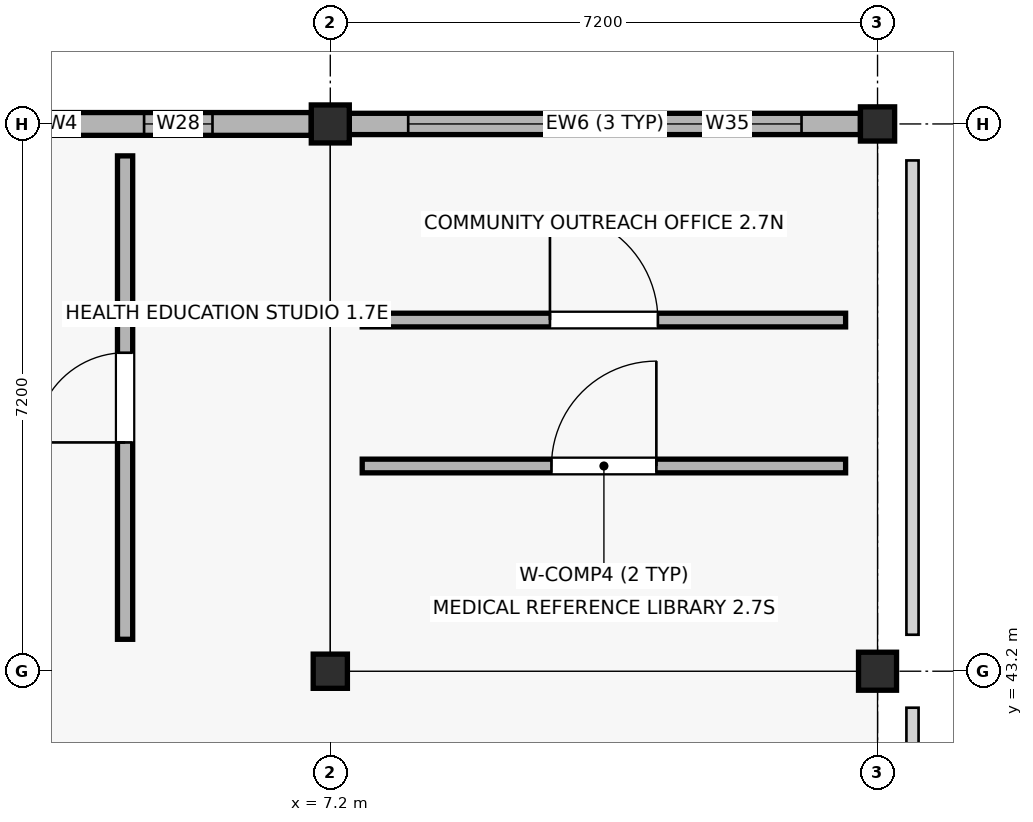
"""IFC4 building model, lengths in metres.
Left out: names, types, materials, properties, quantities, classifications, styles, units other than length and angle.
Written with IfcOpenShell. Run it as: python <this file> out.ifc"""

import sys

from ifc_helpers import new_model, si_unit, direction, frame, frame_2d, origin, origin_2d, place, context, subcontext, project, spatial, rectangle, extrude, element, fill, save


model = new_model("IFC4")
c1 = context("Model", 3, precision=1e-05, world=origin(), true_north=direction((0.0, 1.0)))
c2 = subcontext(c1, "Body", "Model", "MODEL_VIEW")
j1 = project(units=[si_unit("LENGTHUNIT", "METRE"), si_unit("PLANEANGLEUNIT", "RADIAN")], contexts=[c1])
p1 = place(None, origin())
s1 = spatial("IfcSite", under=j1, at=p1, CompositionType="ELEMENT")
p2 = place(p1, origin())
s2 = spatial("IfcBuilding", under=s1, at=p2, CompositionType="ELEMENT")
p3 = place(p2, frame((0.0, 0.0, 13.5)))
s3 = spatial("IfcBuildingStorey", under=s2, at=p3, CompositionType="ELEMENT", Elevation=13.5)
p4 = place(p3, frame((7.2, 43.2, 0.0), z_axis=(0.0, 0.0, 1.0), x_axis=(1.0, 0.0, 0.0)))
e1 = element("IfcColumn", 1, at=p4, inside=s3, PredefinedType="COLUMN", context=c2, shape_type="SweptSolid", body=[
    extrude(rectangle(XDim=0.45, YDim=0.45, at=origin_2d()), origin(), (0.0, 0.0, 1.0), 3.83),
])
for number, where, z_axis, x_axis in (
    (2, (7.2, 50.4, 0.0), (0.0, 0.0, 1.0), (1.0, 0.0, 0.0)),
    (3, (14.4, 43.2, 0.0), (0.0, 0.0, 1.0), (1.0, 0.0, 0.0)),
):
    element("IfcColumn", number, at=place(p3, frame(where, z_axis=z_axis, x_axis=x_axis)), inside=s3, PredefinedType="COLUMN", context=c2, shape_type="SweptSolid", body=[
        extrude(rectangle(XDim=0.5, YDim=0.5, at=origin_2d()), origin(), (0.0, 0.0, 1.0), 3.83),
    ])
p5 = place(p3, frame((14.4, 50.4, 0.0), z_axis=(0.0, 0.0, 1.0), x_axis=(1.0, 0.0, 0.0)))
e4 = element("IfcColumn", 4, at=p5, inside=s3, PredefinedType="COLUMN", context=c2, shape_type="SweptSolid", body=[
    extrude(rectangle(XDim=0.45, YDim=0.45, at=origin_2d()), origin(), (0.0, 0.0, 1.0), 3.83),
])
p6 = place(p3, frame((6.95, 50.4, 0.0), z_axis=(0.0, 0.0, 1.0), x_axis=(-1.0, 0.0, 0.0)))
e5 = element("IfcWall", 5, at=p6, inside=s3, PredefinedType="STANDARD", context=c2, shape_type="SweptSolid", body=[
    extrude(rectangle(XDim=6.725, YDim=0.3, at=frame_2d((3.362, 0.0))), origin(), (0.0, 0.0, 1.0), 3.14),
])
p7 = place(p6, frame((1.3, 0.0, 0.9)))
e6 = element("IfcOpeningElement", 6, at=p7, cuts=e5, PredefinedType="OPENING", context=c2, shape_type="SweptSolid", body=[
    extrude(rectangle(XDim=0.9, YDim=1.62, at=frame_2d((0.45, 0.81))), frame((0.0, 0.16, 0.0), z_axis=(0.0, -1.0, 0.0), x_axis=(1.0, 0.0, 0.0)), (0.0, 0.0, 1.0), 0.32),
])
p8 = place(p6, frame((4.525, 0.0, 0.9)))
e7 = element("IfcOpeningElement", 7, at=p8, cuts=e5, PredefinedType="OPENING", context=c2, shape_type="SweptSolid", body=[
    extrude(rectangle(XDim=0.9, YDim=1.62, at=frame_2d((0.45, 0.81))), frame((0.0, 0.16, 0.0), z_axis=(0.0, -1.0, 0.0), x_axis=(1.0, 0.0, 0.0)), (0.0, 0.0, 1.0), 0.32),
])
p9 = place(p3, frame((14.175, 50.4, 0.0), z_axis=(0.0, 0.0, 1.0), x_axis=(-1.0, 0.0, 0.0)))
e8 = element("IfcWall", 8, at=p9, inside=s3, PredefinedType="STANDARD", context=c2, shape_type="SweptSolid", body=[
    extrude(rectangle(XDim=6.725, YDim=0.28, at=frame_2d((3.363, 0.0))), origin(), (0.0, 0.0, 1.0), 3.14),
])
p10 = place(p9, frame((0.775, 0.0, 0.9)))
e9 = element("IfcOpeningElement", 9, at=p10, cuts=e8, PredefinedType="OPENING", context=c2, shape_type="SweptSolid", body=[
    extrude(rectangle(XDim=1.95, YDim=1.62, at=frame_2d((0.975, 0.81))), frame((0.0, 0.15, 0.0), z_axis=(0.0, -1.0, 0.0), x_axis=(1.0, 0.0, 0.0)), (0.0, 0.0, 1.0), 0.3),
])
p11 = place(p9, frame((4.0, 0.0, 0.9)))
e10 = element("IfcOpeningElement", 10, at=p11, cuts=e8, PredefinedType="OPENING", context=c2, shape_type="SweptSolid", body=[
    extrude(rectangle(XDim=1.95, YDim=1.62, at=frame_2d((0.975, 0.81))), frame((0.0, 0.15, 0.0), z_axis=(0.0, -1.0, 0.0), x_axis=(1.0, 0.0, 0.0)), (0.0, 0.0, 1.0), 0.3),
])
p12 = place(p3, frame((4.5, 43.62, 0.0), z_axis=(0.0, 0.0, 1.0), x_axis=(0.0, 1.0, 0.0)))
e11 = element("IfcWall", 11, at=p12, inside=s3, PredefinedType="SOLIDWALL", context=c2, shape_type="SweptSolid", body=[
    extrude(rectangle(XDim=6.36, YDim=0.2, at=frame_2d((3.18, 0.0))), origin(), (0.0, 0.0, 1.0), 2.93),
])
p13 = place(p12, frame((2.59, 0.0, 0.0)))
e12 = element("IfcOpeningElement", 12, at=p13, cuts=e11, PredefinedType="OPENING", context=c2, shape_type="SweptSolid", body=[
    extrude(rectangle(XDim=1.18, YDim=2.14, at=frame_2d((0.59, 1.07))), frame((0.0, 0.11, 0.0), z_axis=(0.0, -1.0, 0.0), x_axis=(1.0, 0.0, 0.0)), (0.0, 0.0, 1.0), 0.22),
])
p14 = place(p3, frame((7.62, 45.9, 0.0), z_axis=(0.0, 0.0, 1.0), x_axis=(1.0, 0.0, 0.0)))
e13 = element("IfcWall", 13, at=p14, inside=s3, PredefinedType="PARTITIONING", context=c2, shape_type="SweptSolid", body=[
    extrude(rectangle(XDim=6.36, YDim=0.18, at=frame_2d((3.18, 0.0))), origin(), (0.0, 0.0, 1.0), 2.93),
])
p15 = place(p14, frame((2.49, 0.0, 0.0)))
e14 = element("IfcOpeningElement", 14, at=p15, cuts=e13, PredefinedType="OPENING", context=c2, shape_type="SweptSolid", body=[
    extrude(rectangle(XDim=1.38, YDim=2.14, at=frame_2d((0.69, 1.07))), frame((0.0, 0.1, 0.0), z_axis=(0.0, -1.0, 0.0), x_axis=(1.0, 0.0, 0.0)), (0.0, 0.0, 1.0), 0.2),
])
p16 = place(p3, frame((7.62, 47.82, 0.0), z_axis=(0.0, 0.0, 1.0), x_axis=(1.0, 0.0, 0.0)))
e15 = element("IfcWall", 15, at=p16, inside=s3, PredefinedType="PARTITIONING", context=c2, shape_type="SweptSolid", body=[
    extrude(rectangle(XDim=6.36, YDim=0.18, at=frame_2d((3.18, 0.0))), origin(), (0.0, 0.0, 1.0), 2.93),
])
p17 = place(p16, frame((2.47, 0.0, 0.0)))
e16 = element("IfcOpeningElement", 16, at=p17, cuts=e15, PredefinedType="OPENING", context=c2, shape_type="SweptSolid", body=[
    extrude(rectangle(XDim=1.42, YDim=2.14, at=frame_2d((0.71, 1.07))), frame((0.0, 0.1, 0.0), z_axis=(0.0, -1.0, 0.0), x_axis=(1.0, 0.0, 0.0)), (0.0, 0.0, 1.0), 0.2),
])
p18 = place(p7, origin())
e17 = element("IfcWindow", 17, at=p18, inside=s3, PartitioningType="SINGLE_PANEL", PredefinedType="WINDOW", context=c2, shape_type="SweptSolid", body=[
    extrude(rectangle(XDim=0.9, YDim=1.62, at=frame_2d((0.45, 0.81))), frame((0.0, 0.03, 0.0), z_axis=(0.0, -1.0, 0.0), x_axis=(1.0, 0.0, 0.0)), (0.0, 0.0, 1.0), 0.06),
])
fill(e6, e17)
p19 = place(p10, origin())
e18 = element("IfcWindow", 18, at=p19, inside=s3, PartitioningType="SINGLE_PANEL", PredefinedType="WINDOW", context=c2, shape_type="SweptSolid", body=[
    extrude(rectangle(XDim=1.95, YDim=1.62, at=frame_2d((0.975, 0.81))), frame((0.0, 0.03, 0.0), z_axis=(0.0, -1.0, 0.0), x_axis=(1.0, 0.0, 0.0)), (0.0, 0.0, 1.0), 0.06),
])
fill(e9, e18)
p20 = place(p11, origin())
e19 = element("IfcWindow", 19, at=p20, inside=s3, PartitioningType="SINGLE_PANEL", PredefinedType="WINDOW", context=c2, shape_type="SweptSolid", body=[
    extrude(rectangle(XDim=1.95, YDim=1.62, at=frame_2d((0.975, 0.81))), frame((0.0, 0.03, 0.0), z_axis=(0.0, -1.0, 0.0), x_axis=(1.0, 0.0, 0.0)), (0.0, 0.0, 1.0), 0.06),
])
fill(e10, e19)
p21 = place(p13, origin())
e20 = element("IfcDoor", 20, at=p21, inside=s3, OperationType="SINGLE_SWING_LEFT", PredefinedType="DOOR", context=c2, shape_type="SweptSolid", body=[
    extrude(rectangle(XDim=1.18, YDim=2.14, at=frame_2d((0.59, 1.07))), frame((0.0, 0.025, 0.0), z_axis=(0.0, -1.0, 0.0), x_axis=(1.0, 0.0, 0.0)), (0.0, 0.0, 1.0), 0.05),
])
fill(e12, e20)
p22 = place(p15, origin())
e21 = element("IfcDoor", 21, at=p22, inside=s3, OperationType="SINGLE_SWING_RIGHT", PredefinedType="DOOR", context=c2, shape_type="SweptSolid", body=[
    extrude(rectangle(XDim=1.38, YDim=2.14, at=frame_2d((0.69, 1.07))), frame((0.0, 0.025, 0.0), z_axis=(0.0, -1.0, 0.0), x_axis=(1.0, 0.0, 0.0)), (0.0, 0.0, 1.0), 0.05),
])
fill(e14, e21)
p23 = place(p17, origin())
e22 = element("IfcDoor", 22, at=p23, inside=s3, OperationType="SINGLE_SWING_LEFT", PredefinedType="DOOR", context=c2, shape_type="SweptSolid", body=[
    extrude(rectangle(XDim=1.42, YDim=2.14, at=frame_2d((0.71, 1.07))), frame((0.0, 0.025, 0.0), z_axis=(0.0, -1.0, 0.0), x_axis=(1.0, 0.0, 0.0)), (0.0, 0.0, 1.0), 0.05),
])
fill(e16, e22)
save(model, sys.argv[1])
